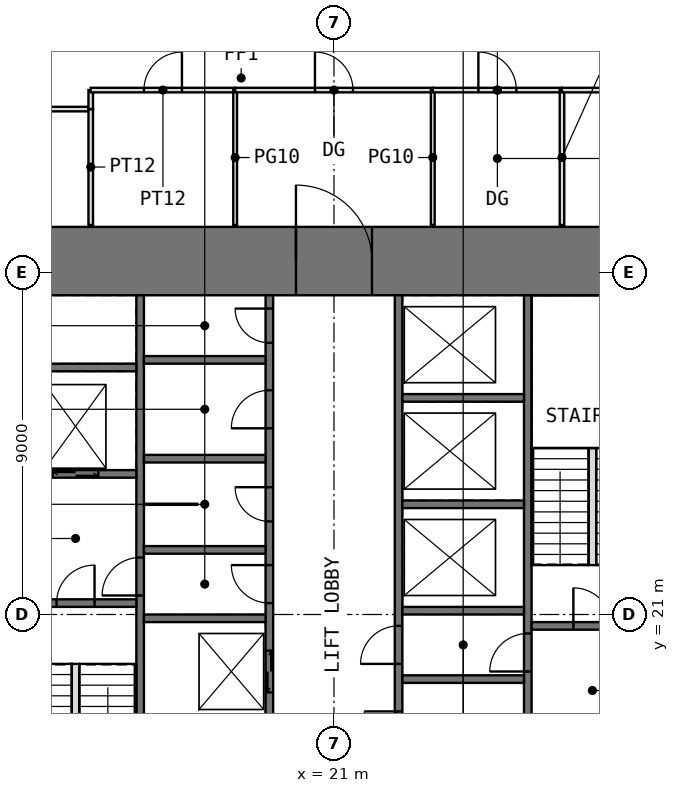
"""IFC4 building model, lengths in metres.
Left out: names, types, materials, properties, quantities, classifications, styles, units other than length and angle.
Written with IfcOpenShell. Run it as: python <this file> out.ifc"""

import sys

from ifc_helpers import new_model, si_unit, direction, frame, frame_2d, origin, place, context, subcontext, project, spatial, rectangle, extrude, element, fill, save


model = new_model("IFC4")
c1 = context("Model", 3, precision=1e-05, world=origin(), true_north=direction((0.0, 1.0)))
c2 = subcontext(c1, "Body", "Model", "MODEL_VIEW")
j1 = project(units=[si_unit("LENGTHUNIT", "METRE"), si_unit("PLANEANGLEUNIT", "RADIAN")], contexts=[c1])
p1 = place(None, origin())
s1 = spatial("IfcSite", under=j1, at=p1, CompositionType="ELEMENT")
p2 = place(p1, origin())
s2 = spatial("IfcBuilding", under=s1, at=p2, CompositionType="ELEMENT")
p3 = place(p2, frame((0.0, 0.0, 22.5)))
s3 = spatial("IfcBuildingStorey", under=s2, at=p3, CompositionType="ELEMENT", Elevation=22.5)
p4 = place(p3, frame((10.8, 30.3, -0.05), z_axis=(0.0, 0.0, 1.0), x_axis=(1.0, 0.0, 0.0)))
e1 = element("IfcWall", 1, at=p4, inside=s3, PredefinedType="SHEAR", context=c2, shape_type="SweptSolid", body=[
    extrude(rectangle(XDim=20.4, YDim=1.8, at=frame_2d((10.2, 0.0))), origin(), (0.0, 0.0, 1.0), 4.0),
])
p5 = place(p4, frame((9.2, 0.0, 0.05)))
e2 = element("IfcOpeningElement", 2, at=p5, cuts=e1, PredefinedType="OPENING", context=c2, shape_type="SweptSolid", body=[
    extrude(rectangle(XDim=2.0, YDim=2.2, at=frame_2d((1.0, 1.1))), frame((0.0, 0.91, 0.0), z_axis=(0.0, -1.0, 0.0), x_axis=(1.0, 0.0, 0.0)), (0.0, 0.0, 1.0), 1.82),
])
p6 = place(p3, frame((15.9, 12.6, -0.05), z_axis=(0.0, 0.0, 1.0), x_axis=(0.0, 1.0, 0.0)))
e3 = element("IfcWall", 3, at=p6, inside=s3, PredefinedType="SHEAR", context=c2, shape_type="SweptSolid", body=[
    extrude(rectangle(XDim=16.8, YDim=0.2, at=frame_2d((8.4, 0.0))), origin(), (0.0, 0.0, 1.0), 4.0),
])
p7 = place(p6, frame((8.9, 0.0, 0.05)))
e4 = element("IfcOpeningElement", 4, at=p7, cuts=e3, PredefinedType="OPENING", context=c2, shape_type="SweptSolid", body=[
    extrude(rectangle(XDim=1.0, YDim=2.2, at=frame_2d((0.5, 1.1))), frame((0.0, 0.11, 0.0), z_axis=(0.0, -1.0, 0.0), x_axis=(1.0, 0.0, 0.0)), (0.0, 0.0, 1.0), 0.22),
])
p8 = place(p3, frame((19.3, 12.6, -0.05), z_axis=(0.0, 0.0, 1.0), x_axis=(0.0, 1.0, 0.0)))
e5 = element("IfcWall", 5, at=p8, inside=s3, PredefinedType="SHEAR", context=c2, shape_type="SweptSolid", body=[
    extrude(rectangle(XDim=16.8, YDim=0.2, at=frame_2d((8.4, 0.0))), origin(), (0.0, 0.0, 1.0), 4.0),
])
p9 = place(p8, frame((8.7, 0.0, 0.05)))
e6 = element("IfcOpeningElement", 6, at=p9, cuts=e5, PredefinedType="OPENING", context=c2, shape_type="SweptSolid", body=[
    extrude(rectangle(XDim=1.0, YDim=2.2, at=frame_2d((0.5, 1.1))), frame((0.0, 0.11, 0.0), z_axis=(0.0, -1.0, 0.0), x_axis=(1.0, 0.0, 0.0)), (0.0, 0.0, 1.0), 0.22),
])
p10 = place(p8, frame((10.85, 0.0, 0.05)))
e7 = element("IfcOpeningElement", 7, at=p10, cuts=e5, PredefinedType="OPENING", context=c2, shape_type="SweptSolid", body=[
    extrude(rectangle(XDim=0.9, YDim=2.2, at=frame_2d((0.45, 1.1))), frame((0.0, 0.11, 0.0), z_axis=(0.0, -1.0, 0.0), x_axis=(1.0, 0.0, 0.0)), (0.0, 0.0, 1.0), 0.22),
])
p11 = place(p8, frame((13.3, 0.0, 0.05)))
e8 = element("IfcOpeningElement", 8, at=p11, cuts=e5, PredefinedType="OPENING", context=c2, shape_type="SweptSolid", body=[
    extrude(rectangle(XDim=1.0, YDim=2.2, at=frame_2d((0.5, 1.1))), frame((0.0, 0.11, 0.0), z_axis=(0.0, -1.0, 0.0), x_axis=(1.0, 0.0, 0.0)), (0.0, 0.0, 1.0), 0.22),
])
p12 = place(p8, frame((15.55, 0.0, 0.05)))
e9 = element("IfcOpeningElement", 9, at=p12, cuts=e5, PredefinedType="OPENING", context=c2, shape_type="SweptSolid", body=[
    extrude(rectangle(XDim=0.9, YDim=2.2, at=frame_2d((0.45, 1.1))), frame((0.0, 0.11, 0.0), z_axis=(0.0, -1.0, 0.0), x_axis=(1.0, 0.0, 0.0)), (0.0, 0.0, 1.0), 0.22),
])
p13 = place(p8, frame((0.75, 0.0, 0.05)))
e10 = element("IfcOpeningElement", 10, at=p13, cuts=e5, PredefinedType="OPENING", context=c2, shape_type="SweptSolid", body=[
    extrude(rectangle(XDim=1.1, YDim=2.2, at=frame_2d((0.55, 1.1))), frame((0.0, 0.11, 0.0), z_axis=(0.0, -1.0, 0.0), x_axis=(1.0, 0.0, 0.0)), (0.0, 0.0, 1.0), 0.22),
])
p14 = place(p8, frame((3.55, 0.0, 0.05)))
e11 = element("IfcOpeningElement", 11, at=p14, cuts=e5, PredefinedType="OPENING", context=c2, shape_type="SweptSolid", body=[
    extrude(rectangle(XDim=1.1, YDim=2.2, at=frame_2d((0.55, 1.1))), frame((0.0, 0.11, 0.0), z_axis=(0.0, -1.0, 0.0), x_axis=(1.0, 0.0, 0.0)), (0.0, 0.0, 1.0), 0.22),
])
p15 = place(p8, frame((6.35, 0.0, 0.05)))
e12 = element("IfcOpeningElement", 12, at=p15, cuts=e5, PredefinedType="OPENING", context=c2, shape_type="SweptSolid", body=[
    extrude(rectangle(XDim=1.1, YDim=2.2, at=frame_2d((0.55, 1.1))), frame((0.0, 0.11, 0.0), z_axis=(0.0, -1.0, 0.0), x_axis=(1.0, 0.0, 0.0)), (0.0, 0.0, 1.0), 0.22),
])
p16 = place(p3, frame((22.7, 12.6, -0.05), z_axis=(0.0, 0.0, 1.0), x_axis=(0.0, 1.0, 0.0)))
e13 = element("IfcWall", 13, at=p16, inside=s3, PredefinedType="SHEAR", context=c2, shape_type="SweptSolid", body=[
    extrude(rectangle(XDim=16.8, YDim=0.2, at=frame_2d((8.4, 0.0))), origin(), (0.0, 0.0, 1.0), 4.0),
])
p17 = place(p16, frame((3.05, 0.0, 0.05)))
e14 = element("IfcOpeningElement", 14, at=p17, cuts=e13, PredefinedType="OPENING", context=c2, shape_type="SweptSolid", body=[
    extrude(rectangle(XDim=0.9, YDim=2.2, at=frame_2d((0.45, 1.1))), frame((0.0, 0.11, 0.0), z_axis=(0.0, -1.0, 0.0), x_axis=(1.0, 0.0, 0.0)), (0.0, 0.0, 1.0), 0.22),
])
p18 = place(p16, frame((7.1, 0.0, 0.05)))
e15 = element("IfcOpeningElement", 15, at=p18, cuts=e13, PredefinedType="OPENING", context=c2, shape_type="SweptSolid", body=[
    extrude(rectangle(XDim=1.0, YDim=2.2, at=frame_2d((0.5, 1.1))), frame((0.0, 0.11, 0.0), z_axis=(0.0, -1.0, 0.0), x_axis=(1.0, 0.0, 0.0)), (0.0, 0.0, 1.0), 0.22),
])
p19 = place(p16, frame((1.55, 0.0, 0.05)))
e16 = element("IfcOpeningElement", 16, at=p19, cuts=e13, PredefinedType="OPENING", context=c2, shape_type="SweptSolid", body=[
    extrude(rectangle(XDim=0.9, YDim=2.2, at=frame_2d((0.45, 1.1))), frame((0.0, 0.11, 0.0), z_axis=(0.0, -1.0, 0.0), x_axis=(1.0, 0.0, 0.0)), (0.0, 0.0, 1.0), 0.22),
])
p20 = place(p16, frame((4.95, 0.0, 0.05)))
e17 = element("IfcOpeningElement", 17, at=p20, cuts=e13, PredefinedType="OPENING", context=c2, shape_type="SweptSolid", body=[
    extrude(rectangle(XDim=0.9, YDim=2.2, at=frame_2d((0.45, 1.1))), frame((0.0, 0.11, 0.0), z_axis=(0.0, -1.0, 0.0), x_axis=(1.0, 0.0, 0.0)), (0.0, 0.0, 1.0), 0.22),
])
p21 = place(p3, frame((26.1, 12.6, -0.05), z_axis=(0.0, 0.0, 1.0), x_axis=(0.0, 1.0, 0.0)))
e18 = element("IfcWall", 18, at=p21, inside=s3, PredefinedType="SHEAR", context=c2, shape_type="SweptSolid", body=[
    extrude(rectangle(XDim=16.8, YDim=0.2, at=frame_2d((8.4, 0.0))), origin(), (0.0, 0.0, 1.0), 4.0),
])
p22 = place(p21, frame((6.9, 0.0, 0.05)))
e19 = element("IfcOpeningElement", 19, at=p22, cuts=e18, PredefinedType="OPENING", context=c2, shape_type="SweptSolid", body=[
    extrude(rectangle(XDim=1.0, YDim=2.2, at=frame_2d((0.5, 1.1))), frame((0.0, 0.11, 0.0), z_axis=(0.0, -1.0, 0.0), x_axis=(1.0, 0.0, 0.0)), (0.0, 0.0, 1.0), 0.22),
])
p23 = place(p3, frame((12.6, 21.3, -0.05), z_axis=(0.0, 0.0, 1.0), x_axis=(1.0, 0.0, 0.0)))
e20 = element("IfcWall", 20, at=p23, inside=s3, PredefinedType="SHEAR", context=c2, shape_type="SweptSolid", body=[
    extrude(rectangle(XDim=3.2, YDim=0.2, at=frame_2d((1.6, 0.0))), origin(), (0.0, 0.0, 1.0), 4.0),
])
p24 = place(p23, frame((1.1, 0.0, 0.05)))
e21 = element("IfcOpeningElement", 21, at=p24, cuts=e20, PredefinedType="OPENING", context=c2, shape_type="SweptSolid", body=[
    extrude(rectangle(XDim=1.0, YDim=2.2, at=frame_2d((0.5, 1.1))), frame((0.0, 0.11, 0.0), z_axis=(0.0, -1.0, 0.0), x_axis=(1.0, 0.0, 0.0)), (0.0, 0.0, 1.0), 0.22),
])
p25 = place(p3, frame((12.6, 24.7, -0.05), z_axis=(0.0, 0.0, 1.0), x_axis=(1.0, 0.0, 0.0)))
e22 = element("IfcWall", 22, at=p25, inside=s3, PredefinedType="SHEAR", context=c2, shape_type="SweptSolid", body=[
    extrude(rectangle(XDim=3.2, YDim=0.2, at=frame_2d((1.6, 0.0))), origin(), (0.0, 0.0, 1.0), 4.0),
])
p26 = place(p25, frame((1.0, 0.0, 0.05)))
e23 = element("IfcOpeningElement", 23, at=p26, cuts=e22, PredefinedType="OPENING", context=c2, shape_type="SweptSolid", body=[
    extrude(rectangle(XDim=1.2, YDim=2.2, at=frame_2d((0.6, 1.1))), frame((0.0, 0.11, 0.0), z_axis=(0.0, -1.0, 0.0), x_axis=(1.0, 0.0, 0.0)), (0.0, 0.0, 1.0), 0.22),
])
for number, where, z_axis, x_axis in (
    (24, (12.6, 27.5, -0.05), (0.0, 0.0, 1.0), (1.0, 0.0, 0.0)),
    (25, (16.0, 20.9, -0.05), (0.0, 0.0, 1.0), (1.0, 0.0, 0.0)),
    (26, (16.0, 22.7, -0.05), (0.0, 0.0, 1.0), (1.0, 0.0, 0.0)),
    (27, (16.0, 25.1, -0.05), (0.0, 0.0, 1.0), (1.0, 0.0, 0.0)),
    (28, (16.0, 27.7, -0.05), (0.0, 0.0, 1.0), (1.0, 0.0, 0.0)),
    (29, (22.8, 19.3, -0.05), (0.0, 0.0, 1.0), (1.0, 0.0, 0.0)),
    (30, (22.8, 21.1, -0.05), (0.0, 0.0, 1.0), (1.0, 0.0, 0.0)),
    (31, (22.8, 23.9, -0.05), (0.0, 0.0, 1.0), (1.0, 0.0, 0.0)),
    (32, (22.8, 26.7, -0.05), (0.0, 0.0, 1.0), (1.0, 0.0, 0.0)),
):
    element("IfcWall", number, at=place(p3, frame(where, z_axis=z_axis, x_axis=x_axis)), inside=s3, PredefinedType="SHEAR", context=c2, shape_type="SweptSolid", body=[
        extrude(rectangle(XDim=3.2, YDim=0.2, at=frame_2d((1.6, 0.0))), origin(), (0.0, 0.0, 1.0), 4.0),
    ])
p27 = place(p3, frame((26.2, 20.7, -0.05), z_axis=(0.0, 0.0, 1.0), x_axis=(1.0, 0.0, 0.0)))
e33 = element("IfcWall", 33, at=p27, inside=s3, PredefinedType="SHEAR", context=c2, shape_type="SweptSolid", body=[
    extrude(rectangle(XDim=3.2, YDim=0.2, at=frame_2d((1.6, 0.0))), origin(), (0.0, 0.0, 1.0), 4.0),
])
p28 = place(p27, frame((1.1, 0.0, 0.05)))
e34 = element("IfcOpeningElement", 34, at=p28, cuts=e33, PredefinedType="OPENING", context=c2, shape_type="SweptSolid", body=[
    extrude(rectangle(XDim=1.0, YDim=2.2, at=frame_2d((0.5, 1.1))), frame((0.0, 0.11, 0.0), z_axis=(0.0, -1.0, 0.0), x_axis=(1.0, 0.0, 0.0)), (0.0, 0.0, 1.0), 0.22),
])
p29 = place(p3, frame((16.0, 23.9, 0.0), z_axis=(0.0, 0.0, 1.0), x_axis=(1.0, 0.0, 0.0)))
e35 = element("IfcWall", 35, at=p29, inside=s3, PredefinedType="PARTITIONING", context=c2, shape_type="SweptSolid", body=[
    extrude(rectangle(XDim=1.4, YDim=0.03, at=frame_2d((0.7, 0.0))), origin(), (0.0, 0.0, 1.0), 3.75),
])
p30 = place(p3, frame((10.8, 34.3, 0.0), z_axis=(0.0, 0.0, 1.0), x_axis=(1.0, 0.0, 0.0)))
e36 = element("IfcWall", 36, at=p30, inside=s3, PredefinedType="PARTITIONING", context=c2, shape_type="SweptSolid", body=[
    extrude(rectangle(XDim=3.8, YDim=0.12, at=frame_2d((1.9, 0.0))), origin(), (0.0, 0.0, 1.0), 3.75),
])
p31 = place(p30, frame((1.4, 0.0, 0.0)))
e37 = element("IfcOpeningElement", 37, at=p31, cuts=e36, PredefinedType="OPENING", context=c2, shape_type="SweptSolid", body=[
    extrude(rectangle(XDim=1.0, YDim=2.2, at=frame_2d((0.5, 1.1))), frame((0.0, 0.07, 0.0), z_axis=(0.0, -1.0, 0.0), x_axis=(1.0, 0.0, 0.0)), (0.0, 0.0, 1.0), 0.14),
])
p32 = place(p3, frame((14.6, 31.25, 0.0), z_axis=(0.0, 0.0, 1.0), x_axis=(0.0, 1.0, 0.0)))
e38 = element("IfcWall", 38, at=p32, inside=s3, PredefinedType="PARTITIONING", context=c2, shape_type="SweptSolid", body=[
    extrude(rectangle(XDim=3.05, YDim=0.12, at=frame_2d((1.525, 0.0))), origin(), (0.0, 0.0, 1.0), 3.75),
])
p33 = place(p3, frame((14.6, 34.3, 0.0), z_axis=(0.0, 0.0, 1.0), x_axis=(0.0, 1.0, 0.0)))
e39 = element("IfcWall", 39, at=p33, inside=s3, PredefinedType="PARTITIONING", context=c2, shape_type="SweptSolid", body=[
    extrude(rectangle(XDim=0.5, YDim=0.12, at=frame_2d((0.25, 0.0))), origin(), (0.0, 0.0, 1.0), 3.75),
])
p34 = place(p3, frame((14.6, 34.8, 0.0), z_axis=(0.0, 0.0, 1.0), x_axis=(1.0, 0.0, 0.0)))
e40 = element("IfcWall", 40, at=p34, inside=s3, PredefinedType="PARTITIONING", context=c2, shape_type="SweptSolid", body=[
    extrude(rectangle(XDim=3.8, YDim=0.12, at=frame_2d((1.9, 0.0))), origin(), (0.0, 0.0, 1.0), 3.75),
])
p35 = place(p34, frame((1.4, 0.0, 0.0)))
e41 = element("IfcOpeningElement", 41, at=p35, cuts=e40, PredefinedType="OPENING", context=c2, shape_type="SweptSolid", body=[
    extrude(rectangle(XDim=1.0, YDim=2.4, at=frame_2d((0.5, 1.2))), frame((0.0, 0.07, 0.0), z_axis=(0.0, -1.0, 0.0), x_axis=(1.0, 0.0, 0.0)), (0.0, 0.0, 1.0), 0.14),
])
p36 = place(p3, frame((18.4, 31.25, 0.0), z_axis=(0.0, 0.0, 1.0), x_axis=(0.0, 1.0, 0.0)))
e42 = element("IfcWall", 42, at=p36, inside=s3, PredefinedType="PARTITIONING", context=c2, shape_type="SweptSolid", body=[
    extrude(rectangle(XDim=3.55, YDim=0.1, at=frame_2d((1.775, 0.0))), origin(), (0.0, 0.0, 1.0), 3.75),
])
p37 = place(p3, frame((18.4, 34.8, 0.0), z_axis=(0.0, 0.0, 1.0), x_axis=(1.0, 0.0, 0.0)))
e43 = element("IfcWall", 43, at=p37, inside=s3, PredefinedType="PARTITIONING", context=c2, shape_type="SweptSolid", body=[
    extrude(rectangle(XDim=5.2, YDim=0.12, at=frame_2d((2.6, 0.0))), origin(), (0.0, 0.0, 1.0), 3.75),
])
p38 = place(p37, frame((2.1, 0.0, 0.0)))
e44 = element("IfcOpeningElement", 44, at=p38, cuts=e43, PredefinedType="OPENING", context=c2, shape_type="SweptSolid", body=[
    extrude(rectangle(XDim=1.0, YDim=2.4, at=frame_2d((0.5, 1.2))), frame((0.0, 0.07, 0.0), z_axis=(0.0, -1.0, 0.0), x_axis=(1.0, 0.0, 0.0)), (0.0, 0.0, 1.0), 0.14),
])
p39 = place(p3, frame((23.6, 31.25, 0.0), z_axis=(0.0, 0.0, 1.0), x_axis=(0.0, 1.0, 0.0)))
e45 = element("IfcWall", 45, at=p39, inside=s3, PredefinedType="PARTITIONING", context=c2, shape_type="SweptSolid", body=[
    extrude(rectangle(XDim=3.55, YDim=0.1, at=frame_2d((1.775, 0.0))), origin(), (0.0, 0.0, 1.0), 3.75),
])
p40 = place(p3, frame((23.6, 34.8, 0.0), z_axis=(0.0, 0.0, 1.0), x_axis=(1.0, 0.0, 0.0)))
e46 = element("IfcWall", 46, at=p40, inside=s3, PredefinedType="PARTITIONING", context=c2, shape_type="SweptSolid", body=[
    extrude(rectangle(XDim=3.4, YDim=0.12, at=frame_2d((1.7, 0.0))), origin(), (0.0, 0.0, 1.0), 3.75),
])
p41 = place(p40, frame((1.2, 0.0, 0.0)))
e47 = element("IfcOpeningElement", 47, at=p41, cuts=e46, PredefinedType="OPENING", context=c2, shape_type="SweptSolid", body=[
    extrude(rectangle(XDim=1.0, YDim=2.4, at=frame_2d((0.5, 1.2))), frame((0.0, 0.07, 0.0), z_axis=(0.0, -1.0, 0.0), x_axis=(1.0, 0.0, 0.0)), (0.0, 0.0, 1.0), 0.14),
])
p42 = place(p3, frame((27.0, 31.25, 0.0), z_axis=(0.0, 0.0, 1.0), x_axis=(0.0, 1.0, 0.0)))
e48 = element("IfcWall", 48, at=p42, inside=s3, PredefinedType="PARTITIONING", context=c2, shape_type="SweptSolid", body=[
    extrude(rectangle(XDim=3.55, YDim=0.12, at=frame_2d((1.775, 0.0))), origin(), (0.0, 0.0, 1.0), 3.75),
])
p43 = place(p3, frame((27.0, 34.8, 0.0), z_axis=(0.0, 0.0, 1.0), x_axis=(1.0, 0.0, 0.0)))
e49 = element("IfcWall", 49, at=p43, inside=s3, PredefinedType="PARTITIONING", context=c2, shape_type="SweptSolid", body=[
    extrude(rectangle(XDim=4.2, YDim=0.12, at=frame_2d((2.1, 0.0))), origin(), (0.0, 0.0, 1.0), 3.75),
])
p44 = place(p43, frame((1.6, 0.0, 0.0)))
e50 = element("IfcOpeningElement", 50, at=p44, cuts=e49, PredefinedType="OPENING", context=c2, shape_type="SweptSolid", body=[
    extrude(rectangle(XDim=1.0, YDim=2.4, at=frame_2d((0.5, 1.2))), frame((0.0, 0.07, 0.0), z_axis=(0.0, -1.0, 0.0), x_axis=(1.0, 0.0, 0.0)), (0.0, 0.0, 1.0), 0.14),
])
for number, where, z_axis, x_axis in (
    (51, (14.2, 16.62, 0.0), (0.0, 0.0, 1.0), (0.0, 1.0, 0.0)),
    (52, (27.8, 22.3, 0.0), (0.0, 0.0, 1.0), (0.0, 1.0, 0.0)),
):
    element("IfcWall", number, at=place(p3, frame(where, z_axis=z_axis, x_axis=x_axis)), inside=s3, PredefinedType="PARTITIONING", context=c2, shape_type="SweptSolid", body=[
        extrude(rectangle(XDim=3.08, YDim=0.2, at=frame_2d((1.54, 0.0))), origin(), (0.0, 0.0, 1.0), 4.0),
    ])
p45 = place(p5, origin())
e53 = element("IfcDoor", 53, at=p45, inside=s3, OperationType="DOUBLE_DOOR_SINGLE_SWING", PredefinedType="DOOR", context=c2, shape_type="SweptSolid", body=[
    extrude(rectangle(XDim=2.0, YDim=2.2, at=frame_2d((1.0, 1.1))), frame((0.0, 0.025, 0.0), z_axis=(0.0, -1.0, 0.0), x_axis=(1.0, 0.0, 0.0)), (0.0, 0.0, 1.0), 0.05),
])
fill(e2, e53)
p46 = place(p24, origin())
e54 = element("IfcDoor", 54, at=p46, inside=s3, OperationType="SINGLE_SWING_RIGHT", PredefinedType="DOOR", context=c2, shape_type="SweptSolid", body=[
    extrude(rectangle(XDim=1.0, YDim=2.2, at=frame_2d((0.5, 1.1))), frame((0.0, 0.025, 0.0), z_axis=(0.0, -1.0, 0.0), x_axis=(1.0, 0.0, 0.0)), (0.0, 0.0, 1.0), 0.05),
])
fill(e21, e54)
p47 = place(p28, origin())
e55 = element("IfcDoor", 55, at=p47, inside=s3, OperationType="SINGLE_SWING_LEFT", PredefinedType="DOOR", context=c2, shape_type="SweptSolid", body=[
    extrude(rectangle(XDim=1.0, YDim=2.2, at=frame_2d((0.5, 1.1))), frame((0.0, 0.025, 0.0), z_axis=(0.0, -1.0, 0.0), x_axis=(1.0, 0.0, 0.0)), (0.0, 0.0, 1.0), 0.05),
])
fill(e34, e55)
p48 = place(p7, origin())
e56 = element("IfcDoor", 56, at=p48, inside=s3, OperationType="SINGLE_SWING_LEFT", PredefinedType="DOOR", context=c2, shape_type="SweptSolid", body=[
    extrude(rectangle(XDim=1.0, YDim=2.2, at=frame_2d((0.5, 1.1))), frame((0.0, 0.025, 0.0), z_axis=(0.0, -1.0, 0.0), x_axis=(1.0, 0.0, 0.0)), (0.0, 0.0, 1.0), 0.05),
])
fill(e4, e56)
p49 = place(p22, origin())
e57 = element("IfcDoor", 57, at=p49, inside=s3, OperationType="SINGLE_SWING_LEFT", PredefinedType="DOOR", context=c2, shape_type="SweptSolid", body=[
    extrude(rectangle(XDim=1.0, YDim=2.2, at=frame_2d((0.5, 1.1))), frame((0.0, 0.025, 0.0), z_axis=(0.0, -1.0, 0.0), x_axis=(1.0, 0.0, 0.0)), (0.0, 0.0, 1.0), 0.05),
])
fill(e19, e57)
p50 = place(p9, origin())
e58 = element("IfcDoor", 58, at=p50, inside=s3, OperationType="SINGLE_SWING_RIGHT", PredefinedType="DOOR", context=c2, shape_type="SweptSolid", body=[
    extrude(rectangle(XDim=1.0, YDim=2.2, at=frame_2d((0.5, 1.1))), frame((0.0, 0.025, 0.0), z_axis=(0.0, -1.0, 0.0), x_axis=(1.0, 0.0, 0.0)), (0.0, 0.0, 1.0), 0.05),
])
fill(e6, e58)
p51 = place(p18, origin())
e59 = element("IfcDoor", 59, at=p51, inside=s3, OperationType="SINGLE_SWING_LEFT", PredefinedType="DOOR", context=c2, shape_type="SweptSolid", body=[
    extrude(rectangle(XDim=1.0, YDim=2.2, at=frame_2d((0.5, 1.1))), frame((0.0, 0.025, 0.0), z_axis=(0.0, -1.0, 0.0), x_axis=(1.0, 0.0, 0.0)), (0.0, 0.0, 1.0), 0.05),
])
fill(e15, e59)
p52 = place(p10, origin())
e60 = element("IfcDoor", 60, at=p52, inside=s3, OperationType="SINGLE_SWING_RIGHT", PredefinedType="DOOR", context=c2, shape_type="SweptSolid", body=[
    extrude(rectangle(XDim=0.9, YDim=2.2, at=frame_2d((0.45, 1.1))), frame((0.0, 0.025, 0.0), z_axis=(0.0, -1.0, 0.0), x_axis=(1.0, 0.0, 0.0)), (0.0, 0.0, 1.0), 0.05),
])
fill(e7, e60)
p53 = place(p11, origin())
e61 = element("IfcDoor", 61, at=p53, inside=s3, OperationType="SINGLE_SWING_LEFT", PredefinedType="DOOR", context=c2, shape_type="SweptSolid", body=[
    extrude(rectangle(XDim=1.0, YDim=2.2, at=frame_2d((0.5, 1.1))), frame((0.0, 0.025, 0.0), z_axis=(0.0, -1.0, 0.0), x_axis=(1.0, 0.0, 0.0)), (0.0, 0.0, 1.0), 0.05),
])
fill(e8, e61)
p54 = place(p12, origin())
e62 = element("IfcDoor", 62, at=p54, inside=s3, OperationType="SINGLE_SWING_RIGHT", PredefinedType="DOOR", context=c2, shape_type="SweptSolid", body=[
    extrude(rectangle(XDim=0.9, YDim=2.2, at=frame_2d((0.45, 1.1))), frame((0.0, 0.025, 0.0), z_axis=(0.0, -1.0, 0.0), x_axis=(1.0, 0.0, 0.0)), (0.0, 0.0, 1.0), 0.05),
])
fill(e9, e62)
p55 = place(p20, origin())
e63 = element("IfcDoor", 63, at=p55, inside=s3, OperationType="SINGLE_SWING_RIGHT", PredefinedType="DOOR", context=c2, shape_type="SweptSolid", body=[
    extrude(rectangle(XDim=0.9, YDim=2.2, at=frame_2d((0.45, 1.1))), frame((0.0, 0.025, 0.0), z_axis=(0.0, -1.0, 0.0), x_axis=(1.0, 0.0, 0.0)), (0.0, 0.0, 1.0), 0.05),
])
fill(e17, e63)
p56 = place(p35, origin())
e64 = element("IfcDoor", 64, at=p56, inside=s3, OperationType="SINGLE_SWING_RIGHT", PredefinedType="DOOR", context=c2, shape_type="SweptSolid", body=[
    extrude(rectangle(XDim=1.0, YDim=2.4, at=frame_2d((0.5, 1.2))), frame((0.0, 0.025, 0.0), z_axis=(0.0, -1.0, 0.0), x_axis=(1.0, 0.0, 0.0)), (0.0, 0.0, 1.0), 0.05),
])
fill(e41, e64)
p57 = place(p41, origin())
e65 = element("IfcDoor", 65, at=p57, inside=s3, OperationType="SINGLE_SWING_LEFT", PredefinedType="DOOR", context=c2, shape_type="SweptSolid", body=[
    extrude(rectangle(XDim=1.0, YDim=2.4, at=frame_2d((0.5, 1.2))), frame((0.0, 0.025, 0.0), z_axis=(0.0, -1.0, 0.0), x_axis=(1.0, 0.0, 0.0)), (0.0, 0.0, 1.0), 0.05),
])
fill(e47, e65)
p58 = place(p38, origin())
e66 = element("IfcDoor", 66, at=p58, inside=s3, OperationType="SINGLE_SWING_LEFT", PredefinedType="DOOR", context=c2, shape_type="SweptSolid", body=[
    extrude(rectangle(XDim=1.0, YDim=2.4, at=frame_2d((0.5, 1.2))), frame((0.0, 0.025, 0.0), z_axis=(0.0, -1.0, 0.0), x_axis=(1.0, 0.0, 0.0)), (0.0, 0.0, 1.0), 0.05),
])
fill(e44, e66)
p59 = place(p15, origin())
e67 = element("IfcDoor", 67, at=p59, inside=s3, OperationType="DOUBLE_DOOR_SLIDING", PredefinedType="DOOR", context=c2, shape_type="SweptSolid", body=[
    extrude(rectangle(XDim=1.1, YDim=2.2, at=frame_2d((0.55, 1.1))), frame((0.0, 0.025, 0.0), z_axis=(0.0, -1.0, 0.0), x_axis=(1.0, 0.0, 0.0)), (0.0, 0.0, 1.0), 0.05),
])
fill(e12, e67)
p60 = place(p26, origin())
e68 = element("IfcDoor", 68, at=p60, inside=s3, OperationType="DOUBLE_DOOR_SLIDING", PredefinedType="DOOR", context=c2, shape_type="SweptSolid", body=[
    extrude(rectangle(XDim=1.2, YDim=2.2, at=frame_2d((0.6, 1.1))), frame((0.0, 0.025, 0.0), z_axis=(0.0, -1.0, 0.0), x_axis=(1.0, 0.0, 0.0)), (0.0, 0.0, 1.0), 0.05),
])
fill(e23, e68)
save(model, sys.argv[1])
